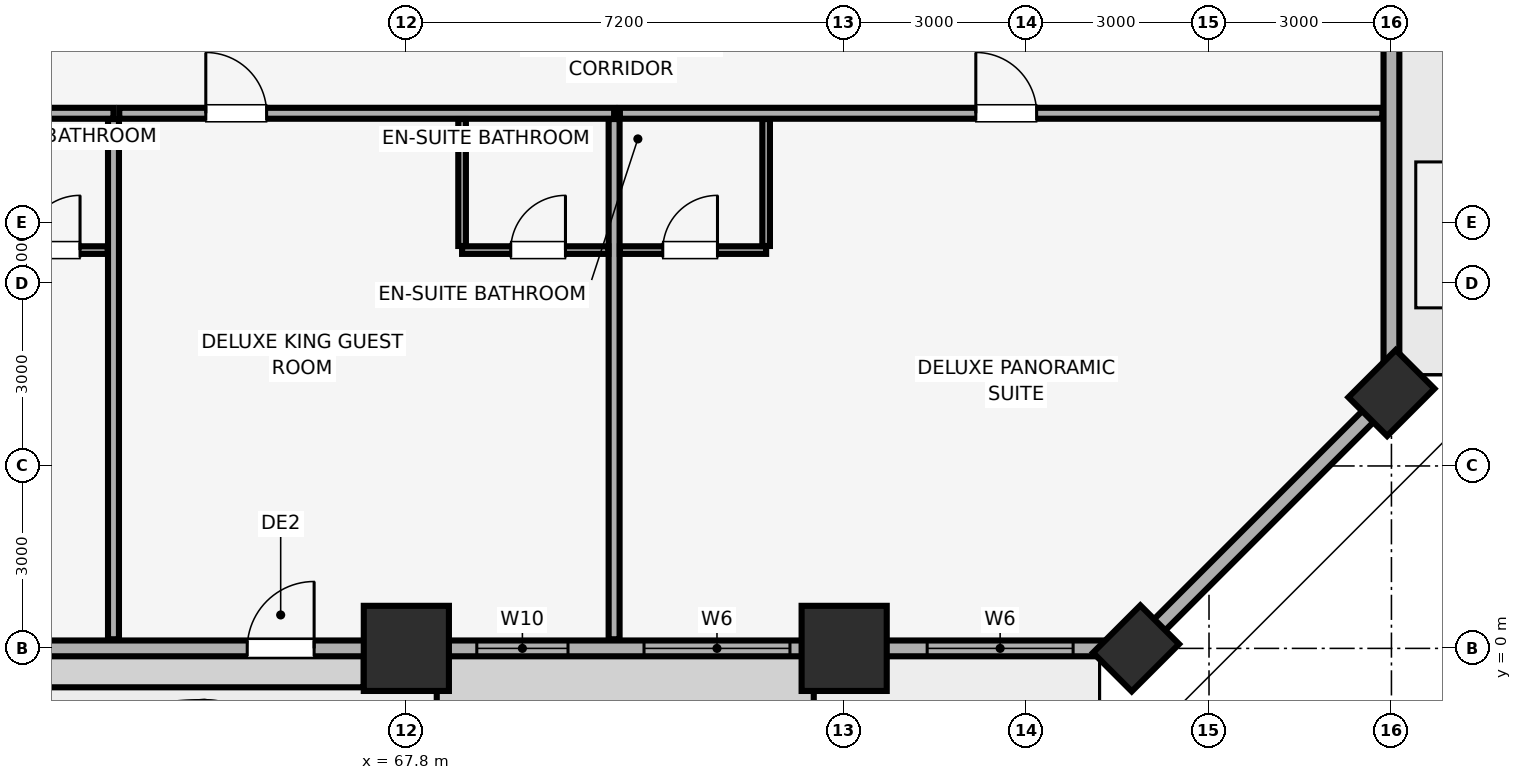
"""IFC4 building model, lengths in metres.
Left out: names, types, materials, properties, quantities, classifications, styles, units other than length and angle.
Written with IfcOpenShell. Run it as: python <this file> out.ifc"""

import sys

from ifc_helpers import new_model, si_unit, direction, frame, frame_2d, origin, origin_2d, place, context, subcontext, project, spatial, rectangle, extrude, element, fill, save


model = new_model("IFC4")
c1 = context("Model", 3, precision=1e-05, world=origin(), true_north=direction((0.0, 1.0)))
c2 = subcontext(c1, "Body", "Model", "MODEL_VIEW")
j1 = project(units=[si_unit("LENGTHUNIT", "METRE"), si_unit("PLANEANGLEUNIT", "RADIAN")], contexts=[c1])
p1 = place(None, origin())
s1 = spatial("IfcSite", under=j1, at=p1, CompositionType="ELEMENT")
p2 = place(p1, origin())
s2 = spatial("IfcBuilding", under=s1, at=p2, CompositionType="ELEMENT")
p3 = place(p2, frame((0.0, 0.0, 31.4)))
s3 = spatial("IfcBuildingStorey", under=s2, at=p3, CompositionType="ELEMENT", Elevation=31.4)
for number, where, z_axis, x_axis in (
    (1, (67.8, 0.0, 0.0), (0.0, 0.0, 1.0), (1.0, 0.0, 0.0)),
    (2, (75.0, 0.0, 0.0), (0.0, 0.0, 1.0), (1.0, 0.0, 0.0)),
):
    element("IfcColumn", number, at=place(p3, frame(where, z_axis=z_axis, x_axis=x_axis)), inside=s3, PredefinedType="COLUMN", context=c2, shape_type="SweptSolid", body=[
        extrude(rectangle(XDim=1.4, YDim=1.4, at=origin_2d()), origin(), (0.0, 0.0, 1.0), 3.51),
    ])
for number, where, z_axis, x_axis in (
    (3, (79.8, 0.0, 0.0), (0.0, 0.0, 1.0), (0.707, 0.707, 0.0)),
    (4, (84.0, 4.2, 0.0), (0.0, 0.0, 1.0), (0.707, 0.707, 0.0)),
):
    element("IfcColumn", number, at=place(p3, frame(where, z_axis=z_axis, x_axis=x_axis)), inside=s3, PredefinedType="PILASTER", context=c2, shape_type="SweptSolid", body=[
        extrude(rectangle(XDim=1.1, YDim=0.9, at=origin_2d()), origin(), (0.0, 0.0, 1.0), 3.51),
    ])
p4 = place(p3, frame((4.2, 0.0, 0.0), z_axis=(0.0, 0.0, 1.0), x_axis=(1.0, 0.0, 0.0)))
e5 = element("IfcWall", 5, at=p4, inside=s3, PredefinedType="SOLIDWALL", context=c2, shape_type="SweptSolid", body=[
    extrude(rectangle(XDim=75.6, YDim=0.26, at=frame_2d((37.8, 0.0))), origin(), (0.0, 0.0, 1.0), 2.56),
])
p5 = place(p4, frame((13.517, 0.0, 0.0)))
e6 = element("IfcOpeningElement", 6, at=p5, cuts=e5, PredefinedType="OPENING", context=c2, shape_type="SweptSolid", body=[
    extrude(rectangle(XDim=1.1, YDim=2.15, at=frame_2d((0.55, 1.075))), frame((0.0, 0.14, 0.0), z_axis=(0.0, -1.0, 0.0), x_axis=(1.0, 0.0, 0.0)), (0.0, 0.0, 1.0), 0.28),
])
p6 = place(p4, frame((28.183, 0.0, 0.0)))
e7 = element("IfcOpeningElement", 7, at=p6, cuts=e5, PredefinedType="OPENING", context=c2, shape_type="SweptSolid", body=[
    extrude(rectangle(XDim=1.1, YDim=2.15, at=frame_2d((0.55, 1.075))), frame((0.0, 0.14, 0.0), z_axis=(0.0, -1.0, 0.0), x_axis=(1.0, 0.0, 0.0)), (0.0, 0.0, 1.0), 0.28),
])
p7 = place(p4, frame((60.983, 0.0, 0.0)))
e8 = element("IfcOpeningElement", 8, at=p7, cuts=e5, PredefinedType="OPENING", context=c2, shape_type="SweptSolid", body=[
    extrude(rectangle(XDim=1.1, YDim=2.15, at=frame_2d((0.55, 1.075))), frame((0.0, 0.14, 0.0), z_axis=(0.0, -1.0, 0.0), x_axis=(1.0, 0.0, 0.0)), (0.0, 0.0, 1.0), 0.28),
])
p8 = place(p4, frame((1.035, 0.0, 0.85)))
e9 = element("IfcOpeningElement", 9, at=p8, cuts=e5, PredefinedType="OPENING", context=c2, shape_type="SweptSolid", body=[
    extrude(rectangle(XDim=2.4, YDim=1.5, at=frame_2d((1.2, 0.75))), frame((0.0, 0.14, 0.0), z_axis=(0.0, -1.0, 0.0), x_axis=(1.0, 0.0, 0.0)), (0.0, 0.0, 1.0), 0.28),
])
p9 = place(p4, frame((7.031, 0.0, 0.85)))
e10 = element("IfcOpeningElement", 10, at=p9, cuts=e5, PredefinedType="OPENING", context=c2, shape_type="SweptSolid", body=[
    extrude(rectangle(XDim=2.4, YDim=1.5, at=frame_2d((1.2, 0.75))), frame((0.0, 0.14, 0.0), z_axis=(0.0, -1.0, 0.0), x_axis=(1.0, 0.0, 0.0)), (0.0, 0.0, 1.0), 0.28),
])
p10 = place(p4, frame((16.757, 0.0, 0.85)))
e11 = element("IfcOpeningElement", 11, at=p10, cuts=e5, PredefinedType="OPENING", context=c2, shape_type="SweptSolid", body=[
    extrude(rectangle(XDim=1.5, YDim=1.4, at=frame_2d((0.75, 0.7))), frame((0.0, 0.14, 0.0), z_axis=(0.0, -1.0, 0.0), x_axis=(1.0, 0.0, 0.0)), (0.0, 0.0, 1.0), 0.28),
])
p11 = place(p4, frame((22.567, 0.0, 0.85)))
e12 = element("IfcOpeningElement", 12, at=p11, cuts=e5, PredefinedType="OPENING", context=c2, shape_type="SweptSolid", body=[
    extrude(rectangle(XDim=2.4, YDim=1.5, at=frame_2d((1.2, 0.75))), frame((0.0, 0.14, 0.0), z_axis=(0.0, -1.0, 0.0), x_axis=(1.0, 0.0, 0.0)), (0.0, 0.0, 1.0), 0.28),
])
p12 = place(p4, frame((30.065, 0.0, 0.85)))
e13 = element("IfcOpeningElement", 13, at=p12, cuts=e5, PredefinedType="OPENING", context=c2, shape_type="SweptSolid", body=[
    extrude(rectangle(XDim=1.5, YDim=1.4, at=frame_2d((0.75, 0.7))), frame((0.0, 0.14, 0.0), z_axis=(0.0, -1.0, 0.0), x_axis=(1.0, 0.0, 0.0)), (0.0, 0.0, 1.0), 0.28),
])
p13 = place(p4, frame((34.55, 0.0, 0.85)))
e14 = element("IfcOpeningElement", 14, at=p13, cuts=e5, PredefinedType="OPENING", context=c2, shape_type="SweptSolid", body=[
    extrude(rectangle(XDim=2.4, YDim=1.5, at=frame_2d((1.2, 0.75))), frame((0.0, 0.14, 0.0), z_axis=(0.0, -1.0, 0.0), x_axis=(1.0, 0.0, 0.0)), (0.0, 0.0, 1.0), 0.28),
])
p14 = place(p4, frame((38.35, 0.0, 0.85)))
e15 = element("IfcOpeningElement", 15, at=p14, cuts=e5, PredefinedType="OPENING", context=c2, shape_type="SweptSolid", body=[
    extrude(rectangle(XDim=2.4, YDim=1.5, at=frame_2d((1.2, 0.75))), frame((0.0, 0.14, 0.0), z_axis=(0.0, -1.0, 0.0), x_axis=(1.0, 0.0, 0.0)), (0.0, 0.0, 1.0), 0.28),
])
p15 = place(p4, frame((44.281, 0.0, 0.85)))
e16 = element("IfcOpeningElement", 16, at=p15, cuts=e5, PredefinedType="OPENING", context=c2, shape_type="SweptSolid", body=[
    extrude(rectangle(XDim=2.4, YDim=1.5, at=frame_2d((1.2, 0.75))), frame((0.0, 0.14, 0.0), z_axis=(0.0, -1.0, 0.0), x_axis=(1.0, 0.0, 0.0)), (0.0, 0.0, 1.0), 0.28),
])
p16 = place(p4, frame((50.332, 0.0, 0.85)))
e17 = element("IfcOpeningElement", 17, at=p16, cuts=e5, PredefinedType="OPENING", context=c2, shape_type="SweptSolid", body=[
    extrude(rectangle(XDim=2.4, YDim=1.5, at=frame_2d((1.2, 0.75))), frame((0.0, 0.14, 0.0), z_axis=(0.0, -1.0, 0.0), x_axis=(1.0, 0.0, 0.0)), (0.0, 0.0, 1.0), 0.28),
])
p17 = place(p4, frame((53.981, 0.0, 0.85)))
e18 = element("IfcOpeningElement", 18, at=p17, cuts=e5, PredefinedType="OPENING", context=c2, shape_type="SweptSolid", body=[
    extrude(rectangle(XDim=1.5, YDim=1.4, at=frame_2d((0.75, 0.7))), frame((0.0, 0.14, 0.0), z_axis=(0.0, -1.0, 0.0), x_axis=(1.0, 0.0, 0.0)), (0.0, 0.0, 1.0), 0.28),
])
p18 = place(p4, frame((64.759, 0.0, 0.85)))
e19 = element("IfcOpeningElement", 19, at=p18, cuts=e5, PredefinedType="OPENING", context=c2, shape_type="SweptSolid", body=[
    extrude(rectangle(XDim=1.5, YDim=1.4, at=frame_2d((0.75, 0.7))), frame((0.0, 0.14, 0.0), z_axis=(0.0, -1.0, 0.0), x_axis=(1.0, 0.0, 0.0)), (0.0, 0.0, 1.0), 0.28),
])
p19 = place(p4, frame((67.509, 0.0, 0.85)))
e20 = element("IfcOpeningElement", 20, at=p19, cuts=e5, PredefinedType="OPENING", context=c2, shape_type="SweptSolid", body=[
    extrude(rectangle(XDim=2.4, YDim=1.5, at=frame_2d((1.2, 0.75))), frame((0.0, 0.14, 0.0), z_axis=(0.0, -1.0, 0.0), x_axis=(1.0, 0.0, 0.0)), (0.0, 0.0, 1.0), 0.28),
])
p20 = place(p4, frame((72.165, 0.0, 0.85)))
e21 = element("IfcOpeningElement", 21, at=p20, cuts=e5, PredefinedType="OPENING", context=c2, shape_type="SweptSolid", body=[
    extrude(rectangle(XDim=2.4, YDim=1.5, at=frame_2d((1.2, 0.75))), frame((0.0, 0.14, 0.0), z_axis=(0.0, -1.0, 0.0), x_axis=(1.0, 0.0, 0.0)), (0.0, 0.0, 1.0), 0.28),
])
p21 = place(p3, frame((79.8, 0.0, 0.0), z_axis=(0.0, 0.0, 1.0), x_axis=(0.707106781187, 0.707106781187, 0.0)))
e22 = element("IfcWall", 22, at=p21, inside=s3, PredefinedType="SOLIDWALL", context=c2, shape_type="SweptSolid", body=[
    extrude(rectangle(XDim=5.94, YDim=0.26, at=frame_2d((2.97, 0.0))), origin(), (0.0, 0.0, 1.0), 2.56),
])
p22 = place(p3, frame((84.0, 4.2, 0.0), z_axis=(0.0, 0.0, 1.0), x_axis=(0.0, 1.0, 0.0)))
e23 = element("IfcWall", 23, at=p22, inside=s3, PredefinedType="SOLIDWALL", context=c2, shape_type="SweptSolid", body=[
    extrude(rectangle(XDim=40.6, YDim=0.26, at=frame_2d((20.3, 0.0))), origin(), (0.0, 0.0, 1.0), 2.56),
])
p23 = place(p22, frame((17.3, 0.0, 0.0)))
e24 = element("IfcOpeningElement", 24, at=p23, cuts=e23, PredefinedType="OPENING", context=c2, shape_type="SweptSolid", body=[
    extrude(rectangle(XDim=1.4, YDim=2.2, at=frame_2d((0.7, 1.1))), frame((0.0, 0.14, 0.0), z_axis=(0.0, -1.0, 0.0), x_axis=(1.0, 0.0, 0.0)), (0.0, 0.0, 1.0), 0.28),
])
p24 = place(p22, frame((7.675, 0.0, 0.85)))
e25 = element("IfcOpeningElement", 25, at=p24, cuts=e23, PredefinedType="OPENING", context=c2, shape_type="SweptSolid", body=[
    extrude(rectangle(XDim=1.5, YDim=1.4, at=frame_2d((0.75, 0.7))), frame((0.0, 0.14, 0.0), z_axis=(0.0, -1.0, 0.0), x_axis=(1.0, 0.0, 0.0)), (0.0, 0.0, 1.0), 0.28),
])
p25 = place(p22, frame((12.76, 0.0, 0.85)))
e26 = element("IfcOpeningElement", 26, at=p25, cuts=e23, PredefinedType="OPENING", context=c2, shape_type="SweptSolid", body=[
    extrude(rectangle(XDim=1.5, YDim=1.4, at=frame_2d((0.75, 0.7))), frame((0.0, 0.14, 0.0), z_axis=(0.0, -1.0, 0.0), x_axis=(1.0, 0.0, 0.0)), (0.0, 0.0, 1.0), 0.28),
])
p26 = place(p22, frame((21.11, 0.0, 0.85)))
e27 = element("IfcOpeningElement", 27, at=p26, cuts=e23, PredefinedType="OPENING", context=c2, shape_type="SweptSolid", body=[
    extrude(rectangle(XDim=1.5, YDim=1.4, at=frame_2d((0.75, 0.7))), frame((0.0, 0.14, 0.0), z_axis=(0.0, -1.0, 0.0), x_axis=(1.0, 0.0, 0.0)), (0.0, 0.0, 1.0), 0.28),
])
p27 = place(p22, frame((29.2, 0.0, 0.85)))
e28 = element("IfcOpeningElement", 28, at=p27, cuts=e23, PredefinedType="OPENING", context=c2, shape_type="SweptSolid", body=[
    extrude(rectangle(XDim=1.5, YDim=1.4, at=frame_2d((0.75, 0.7))), frame((0.0, 0.14, 0.0), z_axis=(0.0, -1.0, 0.0), x_axis=(1.0, 0.0, 0.0)), (0.0, 0.0, 1.0), 0.28),
])
p28 = place(p22, frame((37.365, 0.0, 0.85)))
e29 = element("IfcOpeningElement", 29, at=p28, cuts=e23, PredefinedType="OPENING", context=c2, shape_type="SweptSolid", body=[
    extrude(rectangle(XDim=1.5, YDim=1.4, at=frame_2d((0.75, 0.7))), frame((0.0, 0.14, 0.0), z_axis=(0.0, -1.0, 0.0), x_axis=(1.0, 0.0, 0.0)), (0.0, 0.0, 1.0), 0.28),
])
p29 = place(p3, frame((57.758, 8.8, 0.0), z_axis=(0.0, 0.0, 1.0), x_axis=(1.0, 0.0, 0.0)))
e30 = element("IfcWall", 30, at=p29, inside=s3, PredefinedType="PARTITIONING", context=c2, shape_type="SweptSolid", body=[
    extrude(rectangle(XDim=5.226, YDim=0.18, at=frame_2d((2.613, 0.0))), origin(), (0.0, 0.0, 1.0), 3.51),
])
p30 = place(p29, frame((0.65, 0.0, 0.0)))
e31 = element("IfcOpeningElement", 31, at=p30, cuts=e30, PredefinedType="OPENING", context=c2, shape_type="SweptSolid", body=[
    extrude(rectangle(XDim=1.0, YDim=2.15, at=frame_2d((0.5, 1.075))), frame((0.0, 0.1, 0.0), z_axis=(0.0, -1.0, 0.0), x_axis=(1.0, 0.0, 0.0)), (0.0, 0.0, 1.0), 0.2),
])
p31 = place(p3, frame((62.984, 0.15, 0.0), z_axis=(0.0, 0.0, 1.0), x_axis=(0.0, 1.0, 0.0)))
e32 = element("IfcWall", 32, at=p31, inside=s3, PredefinedType="PARTITIONING", context=c2, shape_type="SweptSolid", body=[
    extrude(rectangle(XDim=8.555, YDim=0.18, at=frame_2d((4.278, 0.0))), origin(), (0.0, 0.0, 1.0), 3.51),
])
p32 = place(p3, frame((60.984, 6.55, 0.0), z_axis=(0.0, 0.0, 1.0), x_axis=(1.0, 0.0, 0.0)))
e33 = element("IfcWall", 33, at=p32, inside=s3, PredefinedType="PARTITIONING", context=c2, shape_type="SweptSolid", body=[
    extrude(rectangle(XDim=1.905, YDim=0.125, at=frame_2d((0.953, 0.0))), origin(), (0.0, 0.0, 1.0), 3.51),
])
p33 = place(p32, frame((0.55, 0.0, 0.0)))
e34 = element("IfcOpeningElement", 34, at=p33, cuts=e33, PredefinedType="OPENING", context=c2, shape_type="SweptSolid", body=[
    extrude(rectangle(XDim=0.9, YDim=2.1, at=frame_2d((0.45, 1.05))), frame((0.0, 0.073, 0.0), z_axis=(0.0, -1.0, 0.0), x_axis=(1.0, 0.0, 0.0)), (0.0, 0.0, 1.0), 0.145),
])
p34 = place(p3, frame((63.079, 8.8, 0.0), z_axis=(0.0, 0.0, 1.0), x_axis=(1.0, 0.0, 0.0)))
e35 = element("IfcWall", 35, at=p34, inside=s3, PredefinedType="PARTITIONING", context=c2, shape_type="SweptSolid", body=[
    extrude(rectangle(XDim=8.138, YDim=0.18, at=frame_2d((4.069, 0.0))), origin(), (0.0, 0.0, 1.0), 3.51),
])
p35 = place(p34, frame((1.423, 0.0, 0.0)))
e36 = element("IfcOpeningElement", 36, at=p35, cuts=e35, PredefinedType="OPENING", context=c2, shape_type="SweptSolid", body=[
    extrude(rectangle(XDim=1.0, YDim=2.15, at=frame_2d((0.5, 1.075))), frame((0.0, 0.1, 0.0), z_axis=(0.0, -1.0, 0.0), x_axis=(1.0, 0.0, 0.0)), (0.0, 0.0, 1.0), 0.2),
])
p36 = place(p3, frame((71.217, 0.15, 0.0), z_axis=(0.0, 0.0, 1.0), x_axis=(0.0, 1.0, 0.0)))
e37 = element("IfcWall", 37, at=p36, inside=s3, PredefinedType="PARTITIONING", context=c2, shape_type="SweptSolid", body=[
    extrude(rectangle(XDim=8.555, YDim=0.18, at=frame_2d((4.278, 0.0))), origin(), (0.0, 0.0, 1.0), 2.898),
])
p37 = place(p3, frame((68.717, 6.55, 0.0), z_axis=(0.0, 0.0, 1.0), x_axis=(1.0, 0.0, 0.0)))
e38 = element("IfcWall", 38, at=p37, inside=s3, PredefinedType="PARTITIONING", context=c2, shape_type="SweptSolid", body=[
    extrude(rectangle(XDim=2.405, YDim=0.125, at=frame_2d((1.202, 0.0))), origin(), (0.0, 0.0, 1.0), 3.51),
])
p38 = place(p37, frame((0.8, 0.0, 0.0)))
e39 = element("IfcOpeningElement", 39, at=p38, cuts=e38, PredefinedType="OPENING", context=c2, shape_type="SweptSolid", body=[
    extrude(rectangle(XDim=0.9, YDim=2.1, at=frame_2d((0.45, 1.05))), frame((0.0, 0.073, 0.0), z_axis=(0.0, -1.0, 0.0), x_axis=(1.0, 0.0, 0.0)), (0.0, 0.0, 1.0), 0.145),
])
p39 = place(p3, frame((68.717, 6.617, 0.0), z_axis=(0.0, 0.0, 1.0), x_axis=(0.0, 1.0, 0.0)))
e40 = element("IfcWall", 40, at=p39, inside=s3, PredefinedType="PARTITIONING", context=c2, shape_type="SweptSolid", body=[
    extrude(rectangle(XDim=2.088, YDim=0.125, at=frame_2d((1.044, 0.0))), origin(), (0.0, 0.0, 1.0), 3.51),
])
p40 = place(p3, frame((71.312, 8.8, 0.0), z_axis=(0.0, 0.0, 1.0), x_axis=(1.0, 0.0, 0.0)))
e41 = element("IfcWall", 41, at=p40, inside=s3, PredefinedType="PARTITIONING", context=c2, shape_type="SweptSolid", body=[
    extrude(rectangle(XDim=12.538, YDim=0.18, at=frame_2d((6.269, 0.0))), origin(), (0.0, 0.0, 1.0), 3.51),
])
p41 = place(p40, frame((5.853, 0.0, 0.0)))
e42 = element("IfcOpeningElement", 42, at=p41, cuts=e41, PredefinedType="OPENING", context=c2, shape_type="SweptSolid", body=[
    extrude(rectangle(XDim=1.0, YDim=2.15, at=frame_2d((0.5, 1.075))), frame((0.0, 0.1, 0.0), z_axis=(0.0, -1.0, 0.0), x_axis=(1.0, 0.0, 0.0)), (0.0, 0.0, 1.0), 0.2),
])
p42 = place(p3, frame((71.312, 6.55, 0.0), z_axis=(0.0, 0.0, 1.0), x_axis=(1.0, 0.0, 0.0)))
e43 = element("IfcWall", 43, at=p42, inside=s3, PredefinedType="PARTITIONING", context=c2, shape_type="SweptSolid", body=[
    extrude(rectangle(XDim=2.405, YDim=0.125, at=frame_2d((1.203, 0.0))), origin(), (0.0, 0.0, 1.0), 3.51),
])
p43 = place(p42, frame((0.705, 0.0, 0.0)))
e44 = element("IfcOpeningElement", 44, at=p43, cuts=e43, PredefinedType="OPENING", context=c2, shape_type="SweptSolid", body=[
    extrude(rectangle(XDim=0.9, YDim=2.1, at=frame_2d((0.45, 1.05))), frame((0.0, 0.073, 0.0), z_axis=(0.0, -1.0, 0.0), x_axis=(1.0, 0.0, 0.0)), (0.0, 0.0, 1.0), 0.145),
])
p44 = place(p3, frame((73.717, 6.617, 0.0), z_axis=(0.0, 0.0, 1.0), x_axis=(0.0, 1.0, 0.0)))
e45 = element("IfcWall", 45, at=p44, inside=s3, PredefinedType="PARTITIONING", context=c2, shape_type="SweptSolid", body=[
    extrude(rectangle(XDim=2.088, YDim=0.125, at=frame_2d((1.044, 0.0))), origin(), (0.0, 0.0, 1.0), 3.51),
])
p45 = place(p7, origin())
e46 = element("IfcDoor", 46, at=p45, inside=s3, OperationType="SINGLE_SWING_RIGHT", PredefinedType="DOOR", context=c2, shape_type="SweptSolid", body=[
    extrude(rectangle(XDim=1.1, YDim=2.15, at=frame_2d((0.55, 1.075))), frame((0.0, 0.025, 0.0), z_axis=(0.0, -1.0, 0.0), x_axis=(1.0, 0.0, 0.0)), (0.0, 0.0, 1.0), 0.05),
])
fill(e8, e46)
p46 = place(p3, frame((0.0, 0.0, -0.28)))
p47 = place(p46, frame((85.6, 6.8, 0.23)))
e47 = element("IfcWindow", 47, at=p47, inside=s3, PartitioningType="SINGLE_PANEL", PredefinedType="SKYLIGHT", context=c2, shape_type="SweptSolid", body=[
    extrude(rectangle(XDim=2.4, YDim=2.4, at=origin_2d()), origin(), (0.0, 0.0, 1.0), 0.05),
])
p48 = place(p18, origin())
e48 = element("IfcWindow", 48, at=p48, inside=s3, PartitioningType="SINGLE_PANEL", PredefinedType="WINDOW", context=c2, shape_type="SweptSolid", body=[
    extrude(rectangle(XDim=1.5, YDim=1.4, at=frame_2d((0.75, 0.7))), frame((0.0, 0.03, 0.0), z_axis=(0.0, -1.0, 0.0), x_axis=(1.0, 0.0, 0.0)), (0.0, 0.0, 1.0), 0.06),
])
fill(e19, e48)
p49 = place(p19, origin())
e49 = element("IfcWindow", 49, at=p49, inside=s3, PartitioningType="SINGLE_PANEL", PredefinedType="WINDOW", context=c2, shape_type="SweptSolid", body=[
    extrude(rectangle(XDim=2.4, YDim=1.5, at=frame_2d((1.2, 0.75))), frame((0.0, 0.03, 0.0), z_axis=(0.0, -1.0, 0.0), x_axis=(1.0, 0.0, 0.0)), (0.0, 0.0, 1.0), 0.06),
])
fill(e20, e49)
p50 = place(p20, origin())
e50 = element("IfcWindow", 50, at=p50, inside=s3, PartitioningType="SINGLE_PANEL", PredefinedType="WINDOW", context=c2, shape_type="SweptSolid", body=[
    extrude(rectangle(XDim=2.4, YDim=1.5, at=frame_2d((1.2, 0.75))), frame((0.0, 0.03, 0.0), z_axis=(0.0, -1.0, 0.0), x_axis=(1.0, 0.0, 0.0)), (0.0, 0.0, 1.0), 0.06),
])
fill(e21, e50)
p51 = place(p33, origin())
e51 = element("IfcDoor", 51, at=p51, inside=s3, OperationType="SINGLE_SWING_RIGHT", PredefinedType="DOOR", context=c2, shape_type="SweptSolid", body=[
    extrude(rectangle(XDim=0.9, YDim=2.1, at=frame_2d((0.45, 1.05))), frame((0.0, 0.025, 0.0), z_axis=(0.0, -1.0, 0.0), x_axis=(1.0, 0.0, 0.0)), (0.0, 0.0, 1.0), 0.05),
])
fill(e34, e51)
p52 = place(p35, origin())
e52 = element("IfcDoor", 52, at=p52, inside=s3, OperationType="SINGLE_SWING_LEFT", PredefinedType="DOOR", context=c2, shape_type="SweptSolid", body=[
    extrude(rectangle(XDim=1.0, YDim=2.15, at=frame_2d((0.5, 1.075))), frame((0.0, 0.025, 0.0), z_axis=(0.0, -1.0, 0.0), x_axis=(1.0, 0.0, 0.0)), (0.0, 0.0, 1.0), 0.05),
])
fill(e36, e52)
p53 = place(p38, origin())
e53 = element("IfcDoor", 53, at=p53, inside=s3, OperationType="SINGLE_SWING_RIGHT", PredefinedType="DOOR", context=c2, shape_type="SweptSolid", body=[
    extrude(rectangle(XDim=0.9, YDim=2.1, at=frame_2d((0.45, 1.05))), frame((0.0, 0.025, 0.0), z_axis=(0.0, -1.0, 0.0), x_axis=(1.0, 0.0, 0.0)), (0.0, 0.0, 1.0), 0.05),
])
fill(e39, e53)
p54 = place(p41, origin())
e54 = element("IfcDoor", 54, at=p54, inside=s3, OperationType="SINGLE_SWING_LEFT", PredefinedType="DOOR", context=c2, shape_type="SweptSolid", body=[
    extrude(rectangle(XDim=1.0, YDim=2.15, at=frame_2d((0.5, 1.075))), frame((0.0, 0.025, 0.0), z_axis=(0.0, -1.0, 0.0), x_axis=(1.0, 0.0, 0.0)), (0.0, 0.0, 1.0), 0.05),
])
fill(e42, e54)
p55 = place(p43, origin())
e55 = element("IfcDoor", 55, at=p55, inside=s3, OperationType="SINGLE_SWING_RIGHT", PredefinedType="DOOR", context=c2, shape_type="SweptSolid", body=[
    extrude(rectangle(XDim=0.9, YDim=2.1, at=frame_2d((0.45, 1.05))), frame((0.0, 0.025, 0.0), z_axis=(0.0, -1.0, 0.0), x_axis=(1.0, 0.0, 0.0)), (0.0, 0.0, 1.0), 0.05),
])
fill(e44, e55)
save(model, sys.argv[1])
